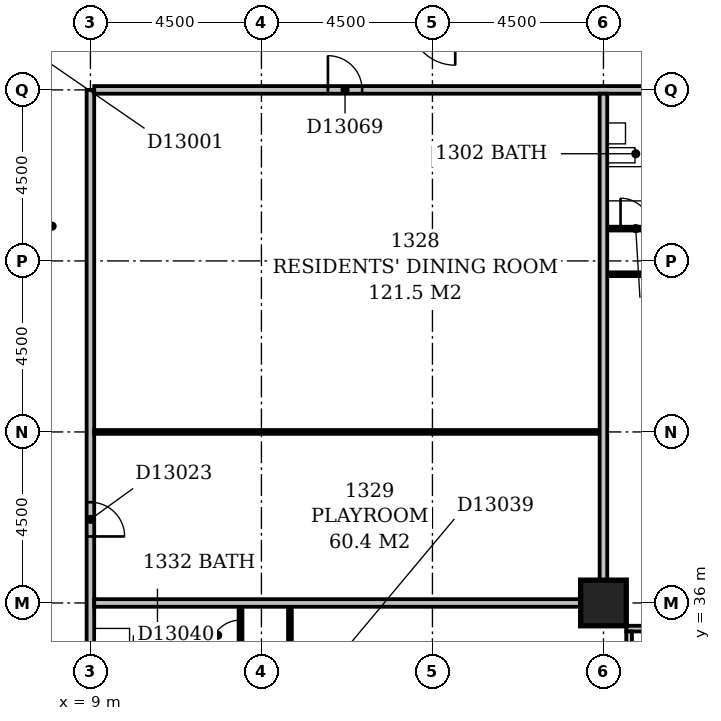
"""IFC4 building model, lengths in metres.
Left out: names, types, materials, properties, quantities, classifications, styles, units other than length and angle.
Written with IfcOpenShell. Run it as: python <this file> out.ifc"""

import sys

from ifc_helpers import new_model, si_unit, direction, frame, frame_2d, origin, origin_2d, place, context, subcontext, project, spatial, rectangle, extrude, element, fill, save


model = new_model("IFC4")
c1 = context("Model", 3, precision=1e-05, world=origin(), true_north=direction((0.0, 1.0)))
c2 = subcontext(c1, "Body", "Model", "MODEL_VIEW")
j1 = project(units=[si_unit("LENGTHUNIT", "METRE"), si_unit("PLANEANGLEUNIT", "RADIAN")], contexts=[c1])
p1 = place(None, origin())
s1 = spatial("IfcSite", under=j1, at=p1, CompositionType="ELEMENT")
p2 = place(p1, origin())
s2 = spatial("IfcBuilding", under=s1, at=p2, CompositionType="ELEMENT")
p3 = place(p2, frame((0.0, 0.0, 57.8)))
s3 = spatial("IfcBuildingStorey", under=s2, at=p3, CompositionType="ELEMENT", Elevation=57.8)
p4 = place(p3, frame((22.5, 36.0, -0.3), z_axis=(0.0, 0.0, 1.0), x_axis=(1.0, 0.0, 0.0)))
e1 = element("IfcColumn", 1, at=p4, inside=s3, PredefinedType="COLUMN", context=c2, shape_type="SweptSolid", body=[
    extrude(rectangle(XDim=1.2, YDim=1.2, at=origin_2d()), origin(), (0.0, 0.0, 1.0), 3.6),
])
p5 = place(p3, frame((23.175, 17.4, 0.0), z_axis=(0.0, 0.0, 1.0), x_axis=(0.0, 1.0, 0.0)))
e2 = element("IfcWall", 2, at=p5, inside=s3, PredefinedType="STANDARD", context=c2, shape_type="SweptSolid", body=[
    extrude(rectangle(XDim=17.85, YDim=0.15, at=frame_2d((8.925, 0.0))), origin(), (0.0, 0.0, 1.0), 2.7),
])
p6 = place(p5, frame((1.65, 0.0, 0.6)))
e3 = element("IfcOpeningElement", 3, at=p6, cuts=e2, PredefinedType="OPENING", context=c2, shape_type="SweptSolid", body=[
    extrude(rectangle(XDim=2.4, YDim=1.8, at=frame_2d((1.2, 0.9))), frame((0.0, 0.087, 0.0), z_axis=(0.0, -1.0, 0.0), x_axis=(1.0, 0.0, 0.0)), (0.0, 0.0, 1.0), 0.174),
])
p7 = place(p5, frame((6.006, 0.0, 0.6)))
e4 = element("IfcOpeningElement", 4, at=p7, cuts=e2, PredefinedType="OPENING", context=c2, shape_type="SweptSolid", body=[
    extrude(rectangle(XDim=0.6, YDim=1.8, at=frame_2d((0.3, 0.9))), frame((0.0, 0.087, 0.0), z_axis=(0.0, -1.0, 0.0), x_axis=(1.0, 0.0, 0.0)), (0.0, 0.0, 1.0), 0.174),
])
p8 = place(p5, frame((10.65, 0.0, 0.6)))
e5 = element("IfcOpeningElement", 5, at=p8, cuts=e2, PredefinedType="OPENING", context=c2, shape_type="SweptSolid", body=[
    extrude(rectangle(XDim=2.4, YDim=1.8, at=frame_2d((1.2, 0.9))), frame((0.0, 0.087, 0.0), z_axis=(0.0, -1.0, 0.0), x_axis=(1.0, 0.0, 0.0)), (0.0, 0.0, 1.0), 0.174),
])
p9 = place(p5, frame((15.15, 0.0, 0.6)))
e6 = element("IfcOpeningElement", 6, at=p9, cuts=e2, PredefinedType="OPENING", context=c2, shape_type="SweptSolid", body=[
    extrude(rectangle(XDim=2.4, YDim=1.8, at=frame_2d((1.2, 0.9))), frame((0.0, 0.087, 0.0), z_axis=(0.0, -1.0, 0.0), x_axis=(1.0, 0.0, 0.0)), (0.0, 0.0, 1.0), 0.174),
])
p10 = place(p3, frame((23.1, 35.325, 0.0), z_axis=(0.0, 0.0, 1.0), x_axis=(1.0, 0.0, 0.0)))
e7 = element("IfcWall", 7, at=p10, inside=s3, PredefinedType="STANDARD", context=c2, shape_type="SweptSolid", body=[
    extrude(rectangle(XDim=45.15, YDim=0.15, at=frame_2d((22.575, 0.0))), origin(), (0.0, 0.0, 1.0), 2.7),
])
p11 = place(p10, frame((0.45, 0.0, 0.6)))
e8 = element("IfcOpeningElement", 8, at=p11, cuts=e7, PredefinedType="OPENING", context=c2, shape_type="SweptSolid", body=[
    extrude(rectangle(XDim=2.4, YDim=1.8, at=frame_2d((1.2, 0.9))), frame((0.0, 0.087, 0.0), z_axis=(0.0, -1.0, 0.0), x_axis=(1.0, 0.0, 0.0)), (0.0, 0.0, 1.0), 0.174),
])
p12 = place(p10, frame((6.854, 0.0, 0.6)))
e9 = element("IfcOpeningElement", 9, at=p12, cuts=e7, PredefinedType="OPENING", context=c2, shape_type="SweptSolid", body=[
    extrude(rectangle(XDim=0.6, YDim=1.8, at=frame_2d((0.3, 0.9))), frame((0.0, 0.087, 0.0), z_axis=(0.0, -1.0, 0.0), x_axis=(1.0, 0.0, 0.0)), (0.0, 0.0, 1.0), 0.174),
])
p13 = place(p10, frame((9.45, 0.0, 0.6)))
e10 = element("IfcOpeningElement", 10, at=p13, cuts=e7, PredefinedType="OPENING", context=c2, shape_type="SweptSolid", body=[
    extrude(rectangle(XDim=2.4, YDim=1.8, at=frame_2d((1.2, 0.9))), frame((0.0, 0.087, 0.0), z_axis=(0.0, -1.0, 0.0), x_axis=(1.0, 0.0, 0.0)), (0.0, 0.0, 1.0), 0.174),
])
p14 = place(p10, frame((13.95, 0.0, 0.6)))
e11 = element("IfcOpeningElement", 11, at=p14, cuts=e7, PredefinedType="OPENING", context=c2, shape_type="SweptSolid", body=[
    extrude(rectangle(XDim=2.4, YDim=1.8, at=frame_2d((1.2, 0.9))), frame((0.0, 0.087, 0.0), z_axis=(0.0, -1.0, 0.0), x_axis=(1.0, 0.0, 0.0)), (0.0, 0.0, 1.0), 0.174),
])
p15 = place(p10, frame((18.323, 0.0, 0.6)))
e12 = element("IfcOpeningElement", 12, at=p15, cuts=e7, PredefinedType="OPENING", context=c2, shape_type="SweptSolid", body=[
    extrude(rectangle(XDim=1.2, YDim=1.8, at=frame_2d((0.6, 0.9))), frame((0.0, 0.087, 0.0), z_axis=(0.0, -1.0, 0.0), x_axis=(1.0, 0.0, 0.0)), (0.0, 0.0, 1.0), 0.174),
])
p16 = place(p10, frame((22.95, 0.0, 0.6)))
e13 = element("IfcOpeningElement", 13, at=p16, cuts=e7, PredefinedType="OPENING", context=c2, shape_type="SweptSolid", body=[
    extrude(rectangle(XDim=2.4, YDim=1.8, at=frame_2d((1.2, 0.9))), frame((0.0, 0.087, 0.0), z_axis=(0.0, -1.0, 0.0), x_axis=(1.0, 0.0, 0.0)), (0.0, 0.0, 1.0), 0.174),
])
p17 = place(p10, frame((27.45, 0.0, 0.6)))
e14 = element("IfcOpeningElement", 14, at=p17, cuts=e7, PredefinedType="OPENING", context=c2, shape_type="SweptSolid", body=[
    extrude(rectangle(XDim=2.4, YDim=1.8, at=frame_2d((1.2, 0.9))), frame((0.0, 0.087, 0.0), z_axis=(0.0, -1.0, 0.0), x_axis=(1.0, 0.0, 0.0)), (0.0, 0.0, 1.0), 0.174),
])
p18 = place(p10, frame((31.706, 0.0, 0.6)))
e15 = element("IfcOpeningElement", 15, at=p18, cuts=e7, PredefinedType="OPENING", context=c2, shape_type="SweptSolid", body=[
    extrude(rectangle(XDim=1.2, YDim=1.8, at=frame_2d((0.6, 0.9))), frame((0.0, 0.087, 0.0), z_axis=(0.0, -1.0, 0.0), x_axis=(1.0, 0.0, 0.0)), (0.0, 0.0, 1.0), 0.174),
])
p19 = place(p10, frame((36.45, 0.0, 0.6)))
e16 = element("IfcOpeningElement", 16, at=p19, cuts=e7, PredefinedType="OPENING", context=c2, shape_type="SweptSolid", body=[
    extrude(rectangle(XDim=2.4, YDim=1.8, at=frame_2d((1.2, 0.9))), frame((0.0, 0.087, 0.0), z_axis=(0.0, -1.0, 0.0), x_axis=(1.0, 0.0, 0.0)), (0.0, 0.0, 1.0), 0.174),
])
p20 = place(p10, frame((40.95, 0.0, 0.6)))
e17 = element("IfcOpeningElement", 17, at=p20, cuts=e7, PredefinedType="OPENING", context=c2, shape_type="SweptSolid", body=[
    extrude(rectangle(XDim=2.4, YDim=1.8, at=frame_2d((1.2, 0.9))), frame((0.0, 0.087, 0.0), z_axis=(0.0, -1.0, 0.0), x_axis=(1.0, 0.0, 0.0)), (0.0, 0.0, 1.0), 0.174),
])
p21 = place(p3, frame((9.0, 5.0, 0.0), z_axis=(0.0, 0.0, 1.0), x_axis=(0.0, 1.0, 0.0)))
e18 = element("IfcWall", 18, at=p21, inside=s3, PredefinedType="PARTITIONING", context=c2, shape_type="SweptSolid", body=[
    extrude(rectangle(XDim=44.5, YDim=0.2, at=frame_2d((22.25, 0.0))), origin(), (0.0, 0.0, 1.0), 3.3),
])
p22 = place(p21, frame((28.05, 0.0, 0.0)))
e19 = element("IfcOpeningElement", 19, at=p22, cuts=e18, PredefinedType="OPENING", context=c2, shape_type="SweptSolid", body=[
    extrude(rectangle(XDim=1.0, YDim=2.1, at=frame_2d((0.5, 1.05))), frame((0.0, 0.112, 0.0), z_axis=(0.0, -1.0, 0.0), x_axis=(1.0, 0.0, 0.0)), (0.0, 0.0, 1.0), 0.224),
])
p23 = place(p21, frame((23.95, 0.0, 0.0)))
e20 = element("IfcOpeningElement", 20, at=p23, cuts=e18, PredefinedType="OPENING", context=c2, shape_type="SweptSolid", body=[
    extrude(rectangle(XDim=1.0, YDim=2.1, at=frame_2d((0.5, 1.05))), frame((0.0, 0.112, 0.0), z_axis=(0.0, -1.0, 0.0), x_axis=(1.0, 0.0, 0.0)), (0.0, 0.0, 1.0), 0.224),
])
p24 = place(p21, frame((18.3, 0.0, 0.0)))
e21 = element("IfcOpeningElement", 21, at=p24, cuts=e18, PredefinedType="OPENING", context=c2, shape_type="SweptSolid", body=[
    extrude(rectangle(XDim=1.0, YDim=2.1, at=frame_2d((0.5, 1.05))), frame((0.0, 0.112, 0.0), z_axis=(0.0, -1.0, 0.0), x_axis=(1.0, 0.0, 0.0)), (0.0, 0.0, 1.0), 0.224),
])
p25 = place(p21, frame((9.3, 0.0, 0.0)))
e22 = element("IfcOpeningElement", 22, at=p25, cuts=e18, PredefinedType="OPENING", context=c2, shape_type="SweptSolid", body=[
    extrude(rectangle(XDim=1.0, YDim=2.1, at=frame_2d((0.5, 1.05))), frame((0.0, 0.112, 0.0), z_axis=(0.0, -1.0, 0.0), x_axis=(1.0, 0.0, 0.0)), (0.0, 0.0, 1.0), 0.224),
])
p26 = place(p21, frame((32.75, 0.0, 0.0)))
e23 = element("IfcOpeningElement", 23, at=p26, cuts=e18, PredefinedType="OPENING", context=c2, shape_type="SweptSolid", body=[
    extrude(rectangle(XDim=0.9, YDim=2.1, at=frame_2d((0.45, 1.05))), frame((0.0, 0.112, 0.0), z_axis=(0.0, -1.0, 0.0), x_axis=(1.0, 0.0, 0.0)), (0.0, 0.0, 1.0), 0.224),
])
p27 = place(p21, frame((1.5, 0.0, 0.0)))
e24 = element("IfcOpeningElement", 24, at=p27, cuts=e18, PredefinedType="OPENING", context=c2, shape_type="SweptSolid", body=[
    extrude(rectangle(XDim=0.9, YDim=2.1, at=frame_2d((0.45, 1.05))), frame((0.0, 0.112, 0.0), z_axis=(0.0, -1.0, 0.0), x_axis=(1.0, 0.0, 0.0)), (0.0, 0.0, 1.0), 0.224),
])
p28 = place(p3, frame((14.25, 31.6, 0.0), z_axis=(0.0, 0.0, 1.0), x_axis=(0.0, 1.0, 0.0)))
e25 = element("IfcWall", 25, at=p28, inside=s3, PredefinedType="PARTITIONING", context=c2, shape_type="SweptSolid", body=[
    extrude(rectangle(XDim=4.3, YDim=0.1, at=frame_2d((2.15, 0.0))), origin(), (0.0, 0.0, 1.0), 3.3),
])
p29 = place(p28, frame((1.7, 0.0, 0.0)))
e26 = element("IfcOpeningElement", 26, at=p29, cuts=e25, PredefinedType="OPENING", context=c2, shape_type="SweptSolid", body=[
    extrude(rectangle(XDim=0.9, YDim=2.1, at=frame_2d((0.45, 1.05))), frame((0.0, 0.062, 0.0), z_axis=(0.0, -1.0, 0.0), x_axis=(1.0, 0.0, 0.0)), (0.0, 0.0, 1.0), 0.124),
])
p30 = place(p3, frame((12.95, 34.3, 0.0), z_axis=(0.0, 0.0, 1.0), x_axis=(0.0, 1.0, 0.0)))
e27 = element("IfcWall", 27, at=p30, inside=s3, PredefinedType="PARTITIONING", context=c2, shape_type="SweptSolid", body=[
    extrude(rectangle(XDim=1.6, YDim=0.1, at=frame_2d((0.8, 0.0))), origin(), (0.0, 0.0, 1.0), 3.3),
])
p31 = place(p30, frame((0.45, 0.0, 0.0)))
e28 = element("IfcOpeningElement", 28, at=p31, cuts=e27, PredefinedType="OPENING", context=c2, shape_type="SweptSolid", body=[
    extrude(rectangle(XDim=0.8, YDim=2.1, at=frame_2d((0.4, 1.05))), frame((0.0, 0.062, 0.0), z_axis=(0.0, -1.0, 0.0), x_axis=(1.0, 0.0, 0.0)), (0.0, 0.0, 1.0), 0.124),
])
p32 = place(p3, frame((9.1, 36.0, 0.0), z_axis=(0.0, 0.0, 1.0), x_axis=(1.0, 0.0, 0.0)))
e29 = element("IfcWall", 29, at=p32, inside=s3, PredefinedType="PARTITIONING", context=c2, shape_type="SweptSolid", body=[
    extrude(rectangle(XDim=12.8, YDim=0.2, at=frame_2d((6.4, 0.0))), origin(), (0.0, 0.0, 1.0), 2.4),
])
p33 = place(p3, frame((22.5, 36.6, 0.0), z_axis=(0.0, 0.0, 1.0), x_axis=(0.0, 1.0, 0.0)))
e30 = element("IfcWall", 30, at=p33, inside=s3, PredefinedType="PARTITIONING", context=c2, shape_type="SweptSolid", body=[
    extrude(rectangle(XDim=12.8, YDim=0.2, at=frame_2d((6.4, 0.0))), origin(), (0.0, 0.0, 1.0), 3.3),
])
p34 = place(p3, frame((9.1, 40.5, 0.0), z_axis=(0.0, 0.0, 1.0), x_axis=(1.0, 0.0, 0.0)))
e31 = element("IfcWall", 31, at=p34, inside=s3, PredefinedType="PARTITIONING", context=c2, shape_type="SweptSolid", body=[
    extrude(rectangle(XDim=13.3, YDim=0.1, at=frame_2d((6.65, 0.0))), origin(), (0.0, 0.0, 1.0), 3.3),
])
p35 = place(p3, frame((22.6, 44.65, 0.0), z_axis=(0.0, 0.0, 1.0), x_axis=(1.0, 0.0, 0.0)))
e32 = element("IfcWall", 32, at=p35, inside=s3, PredefinedType="PARTITIONING", context=c2, shape_type="SweptSolid", body=[
    extrude(rectangle(XDim=4.3, YDim=0.1, at=frame_2d((2.15, 0.0))), origin(), (0.0, 0.0, 1.0), 3.3),
])
p36 = place(p35, frame((1.7, 0.0, 0.0)))
e33 = element("IfcOpeningElement", 33, at=p36, cuts=e32, PredefinedType="OPENING", context=c2, shape_type="SweptSolid", body=[
    extrude(rectangle(XDim=0.9, YDim=2.1, at=frame_2d((0.45, 1.05))), frame((0.0, 0.062, 0.0), z_axis=(0.0, -1.0, 0.0), x_axis=(1.0, 0.0, 0.0)), (0.0, 0.0, 1.0), 0.124),
])
p37 = place(p3, frame((22.6, 45.85, 0.0), z_axis=(0.0, 0.0, 1.0), x_axis=(1.0, 0.0, 0.0)))
e34 = element("IfcWall", 34, at=p37, inside=s3, PredefinedType="PARTITIONING", context=c2, shape_type="SweptSolid", body=[
    extrude(rectangle(XDim=1.55, YDim=0.1, at=frame_2d((0.775, 0.0))), origin(), (0.0, 0.0, 1.0), 3.3),
])
p38 = place(p37, frame((0.35, 0.0, 0.0)))
e35 = element("IfcOpeningElement", 35, at=p38, cuts=e34, PredefinedType="OPENING", context=c2, shape_type="SweptSolid", body=[
    extrude(rectangle(XDim=0.8, YDim=2.1, at=frame_2d((0.4, 1.05))), frame((0.0, 0.062, 0.0), z_axis=(0.0, -1.0, 0.0), x_axis=(1.0, 0.0, 0.0)), (0.0, 0.0, 1.0), 0.124),
])
p39 = place(p3, frame((9.1, 49.5, 0.0), z_axis=(0.0, 0.0, 1.0), x_axis=(1.0, 0.0, 0.0)))
e36 = element("IfcWall", 36, at=p39, inside=s3, PredefinedType="PARTITIONING", context=c2, shape_type="SweptSolid", body=[
    extrude(rectangle(XDim=57.8, YDim=0.2, at=frame_2d((28.9, 0.0))), origin(), (0.0, 0.0, 1.0), 3.3),
])
p40 = place(p39, frame((15.35, 0.0, 0.0)))
e37 = element("IfcOpeningElement", 37, at=p40, cuts=e36, PredefinedType="OPENING", context=c2, shape_type="SweptSolid", body=[
    extrude(rectangle(XDim=1.0, YDim=2.1, at=frame_2d((0.5, 1.05))), frame((0.0, 0.112, 0.0), z_axis=(0.0, -1.0, 0.0), x_axis=(1.0, 0.0, 0.0)), (0.0, 0.0, 1.0), 0.224),
])
p41 = place(p39, frame((18.2, 0.0, 0.0)))
e38 = element("IfcOpeningElement", 38, at=p41, cuts=e36, PredefinedType="OPENING", context=c2, shape_type="SweptSolid", body=[
    extrude(rectangle(XDim=1.0, YDim=2.1, at=frame_2d((0.5, 1.05))), frame((0.0, 0.112, 0.0), z_axis=(0.0, -1.0, 0.0), x_axis=(1.0, 0.0, 0.0)), (0.0, 0.0, 1.0), 0.224),
])
p42 = place(p39, frame((39.6, 0.0, 0.0)))
e39 = element("IfcOpeningElement", 39, at=p42, cuts=e36, PredefinedType="OPENING", context=c2, shape_type="SweptSolid", body=[
    extrude(rectangle(XDim=1.0, YDim=2.1, at=frame_2d((0.5, 1.05))), frame((0.0, 0.112, 0.0), z_axis=(0.0, -1.0, 0.0), x_axis=(1.0, 0.0, 0.0)), (0.0, 0.0, 1.0), 0.224),
])
p43 = place(p39, frame((45.2, 0.0, 0.0)))
e40 = element("IfcOpeningElement", 40, at=p43, cuts=e36, PredefinedType="OPENING", context=c2, shape_type="SweptSolid", body=[
    extrude(rectangle(XDim=1.0, YDim=2.1, at=frame_2d((0.5, 1.05))), frame((0.0, 0.112, 0.0), z_axis=(0.0, -1.0, 0.0), x_axis=(1.0, 0.0, 0.0)), (0.0, 0.0, 1.0), 0.224),
])
p44 = place(p39, frame((54.15, 0.0, 0.0)))
e41 = element("IfcOpeningElement", 41, at=p44, cuts=e36, PredefinedType="OPENING", context=c2, shape_type="SweptSolid", body=[
    extrude(rectangle(XDim=1.0, YDim=2.1, at=frame_2d((0.5, 1.05))), frame((0.0, 0.112, 0.0), z_axis=(0.0, -1.0, 0.0), x_axis=(1.0, 0.0, 0.0)), (0.0, 0.0, 1.0), 0.224),
])
p45 = place(p39, frame((6.15, 0.0, 0.0)))
e42 = element("IfcOpeningElement", 42, at=p45, cuts=e36, PredefinedType="OPENING", context=c2, shape_type="SweptSolid", body=[
    extrude(rectangle(XDim=0.9, YDim=2.1, at=frame_2d((0.45, 1.05))), frame((0.0, 0.112, 0.0), z_axis=(0.0, -1.0, 0.0), x_axis=(1.0, 0.0, 0.0)), (0.0, 0.0, 1.0), 0.224),
])
p46 = place(p26, frame((0.9, 0.0, 0.0), z_axis=(0.0, 0.0, 1.0), x_axis=(-1.0, 0.0, 0.0)))
e43 = element("IfcDoor", 43, at=p46, inside=s3, OperationType="SINGLE_SWING_RIGHT", PredefinedType="DOOR", context=c2, shape_type="SweptSolid", body=[
    extrude(rectangle(XDim=0.9, YDim=2.1, at=frame_2d((0.45, 1.05))), frame((0.0, 0.025, 0.0), z_axis=(0.0, -1.0, 0.0), x_axis=(1.0, 0.0, 0.0)), (0.0, 0.0, 1.0), 0.05),
])
fill(e23, e43)
p47 = place(p31, origin())
e44 = element("IfcDoor", 44, at=p47, inside=s3, OperationType="SINGLE_SWING_LEFT", PredefinedType="DOOR", context=c2, shape_type="SweptSolid", body=[
    extrude(rectangle(XDim=0.8, YDim=2.1, at=frame_2d((0.4, 1.05))), frame((0.0, 0.025, 0.0), z_axis=(0.0, -1.0, 0.0), x_axis=(1.0, 0.0, 0.0)), (0.0, 0.0, 1.0), 0.05),
])
fill(e28, e44)
p48 = place(p38, origin())
e45 = element("IfcDoor", 45, at=p48, inside=s3, OperationType="SINGLE_SWING_LEFT", PredefinedType="DOOR", context=c2, shape_type="SweptSolid", body=[
    extrude(rectangle(XDim=0.8, YDim=2.1, at=frame_2d((0.4, 1.05))), frame((0.0, 0.025, 0.0), z_axis=(0.0, -1.0, 0.0), x_axis=(1.0, 0.0, 0.0)), (0.0, 0.0, 1.0), 0.05),
])
fill(e35, e45)
p49 = place(p45, origin())
e46 = element("IfcDoor", 46, at=p49, inside=s3, OperationType="SINGLE_SWING_LEFT", PredefinedType="DOOR", context=c2, shape_type="SweptSolid", body=[
    extrude(rectangle(XDim=0.9, YDim=2.1, at=frame_2d((0.45, 1.05))), frame((0.0, 0.025, 0.0), z_axis=(0.0, -1.0, 0.0), x_axis=(1.0, 0.0, 0.0)), (0.0, 0.0, 1.0), 0.05),
])
fill(e42, e46)
save(model, sys.argv[1])
